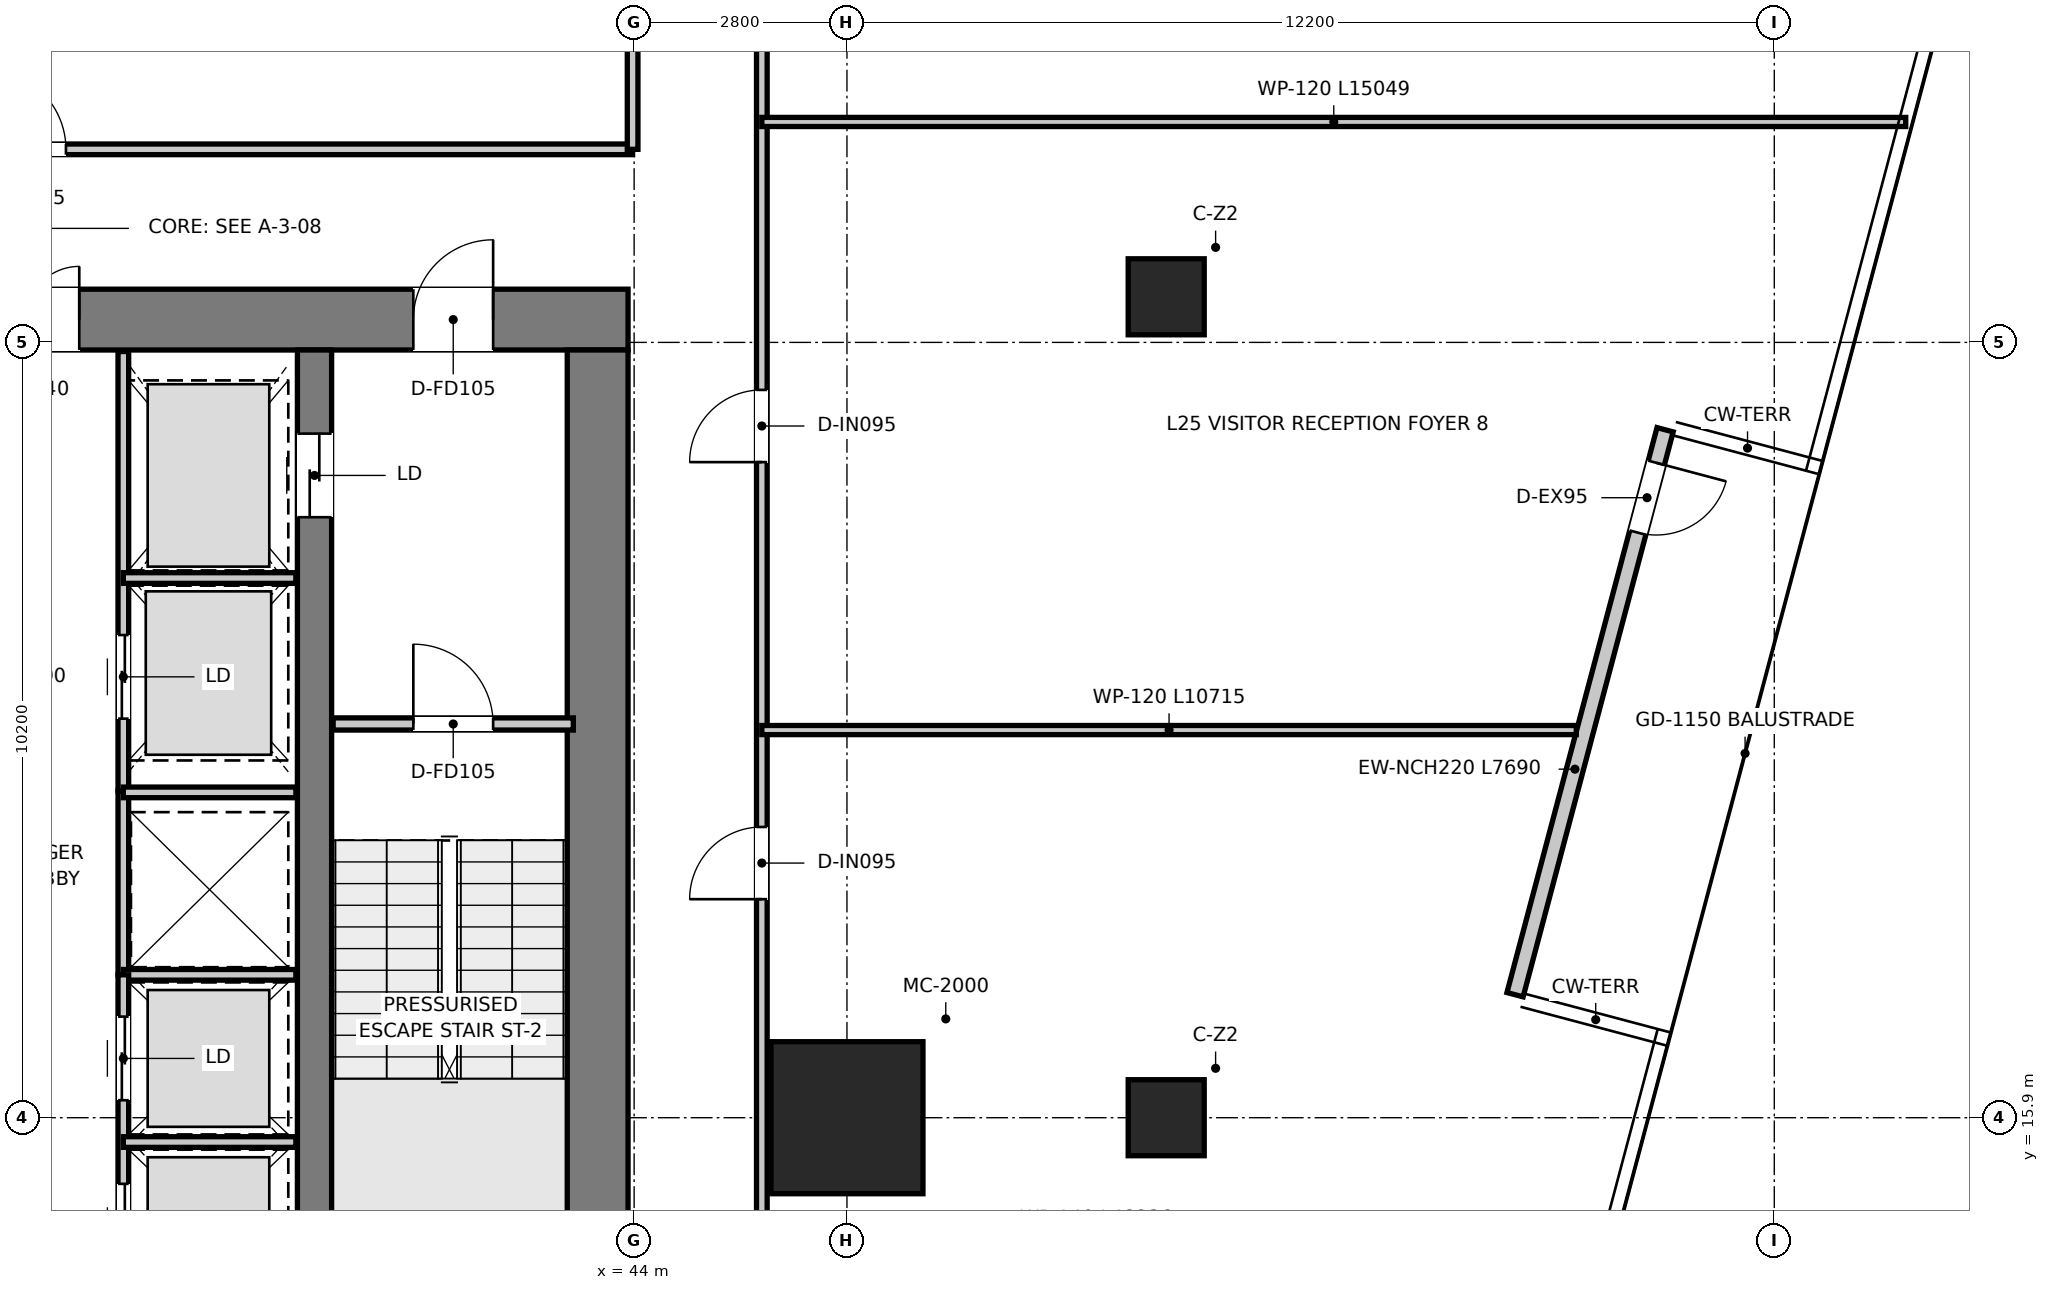
"""IFC4 building model, lengths in metres.
Left out: names, types, materials, properties, quantities, classifications, styles, units other than length and angle.
Written with IfcOpenShell. Run it as: python <this file> out.ifc"""

import sys

from ifc_helpers import new_model, si_unit, direction, frame, frame_2d, origin, origin_2d, place, context, subcontext, project, spatial, rectangle, extrude, source, transform, mapped, element, fill, save


model = new_model("IFC4")
c1 = context("Model", 3, precision=1e-05, world=origin(), true_north=direction((0.0, 1.0)))
c2 = subcontext(c1, "Body", "Model", "MODEL_VIEW")
j1 = project(units=[si_unit("LENGTHUNIT", "METRE"), si_unit("PLANEANGLEUNIT", "RADIAN")], contexts=[c1])
p1 = place(None, origin())
s1 = spatial("IfcSite", under=j1, at=p1, CompositionType="ELEMENT")
p2 = place(p1, origin())
s2 = spatial("IfcBuilding", under=s1, at=p2, CompositionType="ELEMENT")
p3 = place(p2, frame((0.0, 0.0, 105.85)))
s3 = spatial("IfcBuildingStorey", under=s2, at=p3, CompositionType="ELEMENT", Elevation=105.85)
p4 = place(p3, frame((28.08, 26.4, 0.0), z_axis=(0.0, 0.0, 1.0), x_axis=(1.0, 0.0, 0.0)))
e1 = element("IfcWall", 1, at=p4, inside=s3, PredefinedType="SHEAR", context=c2, shape_type="SweptSolid", body=[
    extrude(rectangle(XDim=15.84, YDim=0.8, at=frame_2d((7.92, 0.0))), origin(), (0.0, 0.0, 1.0), 3.95),
])
p5 = place(p4, frame((7.22, 0.0, 0.0)))
e2 = element("IfcOpeningElement", 2, at=p5, cuts=e1, PredefinedType="OPENING", context=c2, shape_type="SweptSolid", body=[
    extrude(rectangle(XDim=1.4, YDim=2.2, at=frame_2d((0.7, 1.1))), frame((0.0, 0.41, 0.0), z_axis=(0.0, -1.0, 0.0), x_axis=(1.0, 0.0, 0.0)), (0.0, 0.0, 1.0), 0.82),
])
p6 = place(p4, frame((1.775, 0.0, 0.0)))
e3 = element("IfcOpeningElement", 3, at=p6, cuts=e1, PredefinedType="OPENING", context=c2, shape_type="SweptSolid", body=[
    extrude(rectangle(XDim=1.05, YDim=2.1, at=frame_2d((0.525, 1.05))), frame((0.0, 0.41, 0.0), z_axis=(0.0, -1.0, 0.0), x_axis=(1.0, 0.0, 0.0)), (0.0, 0.0, 1.0), 0.82),
])
p7 = place(p4, frame((13.015, 0.0, 0.0)))
e4 = element("IfcOpeningElement", 4, at=p7, cuts=e1, PredefinedType="OPENING", context=c2, shape_type="SweptSolid", body=[
    extrude(rectangle(XDim=1.05, YDim=2.1, at=frame_2d((0.525, 1.05))), frame((0.0, 0.41, 0.0), z_axis=(0.0, -1.0, 0.0), x_axis=(1.0, 0.0, 0.0)), (0.0, 0.0, 1.0), 0.82),
])
p8 = place(p3, frame((43.52, 11.3, 0.0), z_axis=(0.0, 0.0, 1.0), x_axis=(0.0, 1.0, 0.0)))
e5 = element("IfcWall", 5, at=p8, inside=s3, PredefinedType="SHEAR", context=c2, shape_type="SweptSolid", body=[
    extrude(rectangle(XDim=14.7, YDim=0.8, at=frame_2d((7.35, 0.0))), origin(), (0.0, 0.0, 1.0), 3.95),
])
p9 = place(p3, frame((39.795, 13.22, 0.0), z_axis=(0.0, 0.0, 1.0), x_axis=(0.0, 1.0, 0.0)))
e6 = element("IfcWall", 6, at=p9, inside=s3, PredefinedType="SHEAR", context=c2, shape_type="SweptSolid", body=[
    extrude(rectangle(XDim=12.78, YDim=0.45, at=frame_2d((6.39, 0.0))), origin(), (0.0, 0.0, 1.0), 3.95),
])
p10 = place(p9, frame((10.58, 0.0, 0.0)))
e7 = element("IfcOpeningElement", 7, at=p10, cuts=e6, PredefinedType="OPENING", context=c2, shape_type="SweptSolid", body=[
    extrude(rectangle(XDim=1.1, YDim=2.15, at=frame_2d((0.55, 1.075))), frame((0.0, 0.235, 0.0), z_axis=(0.0, -1.0, 0.0), x_axis=(1.0, 0.0, 0.0)), (0.0, 0.0, 1.0), 0.47),
])
m1 = source(origin(), c2, "Body", "SweptSolid", [
    extrude(rectangle(XDim=2.0, YDim=2.0, at=origin_2d()), origin(), (0.0, 0.0, 1.0), 3.95),
])
p11 = place(p3, frame((46.8, 15.9, 0.0), z_axis=(0.0, 0.0, 1.0), x_axis=(1.0, 0.0, 0.0)))
e8 = element("IfcColumn", 8, at=p11, inside=s3, PredefinedType="USERDEFINED", context=c2, shape_type="MappedRepresentation", body=[
    mapped(m1, transform((0.0, 0.0, 0.0), x_axis=(1.0, 0.0, 0.0), y_axis=(0.0, 1.0, 0.0), z_axis=(0.0, 0.0, 1.0), scale=1.0)),
])
m2 = source(origin(), c2, "Body", "SweptSolid", [
    extrude(rectangle(XDim=1.0, YDim=1.0, at=origin_2d()), origin(), (0.0, 0.0, 1.0), 3.95),
])
for number, where, z_axis, x_axis in (
    (9, (51.0, 26.7, 0.0), (0.0, 0.0, 1.0), (1.0, 0.0, 0.0)),
    (10, (51.0, 15.9, 0.0), (0.0, 0.0, 1.0), (1.0, 0.0, 0.0)),
):
    element("IfcColumn", number, at=place(p3, frame(where, z_axis=z_axis, x_axis=x_axis)), inside=s3, PredefinedType="COLUMN", context=c2, shape_type="MappedRepresentation", body=[
        mapped(m2, transform((0.0, 0.0, 0.0), x_axis=(1.0, 0.0, 0.0), y_axis=(0.0, 1.0, 0.0), z_axis=(0.0, 0.0, 1.0), scale=1.0)),
    ])
p12 = place(p3, frame((57.563, 24.951, 0.0), z_axis=(0.0, 0.0, 1.0), x_axis=(-0.256717978083, -0.966486357756, 0.0)))
e11 = element("IfcWall", 11, at=p12, inside=s3, PredefinedType="ELEMENTEDWALL", context=c2, shape_type="SweptSolid", body=[
    extrude(rectangle(XDim=7.69, YDim=0.22, at=frame_2d((3.845, 0.0))), origin(), (0.0, 0.0, 1.0), 3.67),
])
p13 = place(p12, frame((0.45, 0.0, 0.0)))
e12 = element("IfcOpeningElement", 12, at=p13, cuts=e11, PredefinedType="OPENING", context=c2, shape_type="SweptSolid", body=[
    extrude(rectangle(XDim=0.95, YDim=2.1, at=frame_2d((0.475, 1.05))), frame((0.0, 0.12, 0.0), z_axis=(0.0, -1.0, 0.0), x_axis=(1.0, 0.0, 0.0)), (0.0, 0.0, 1.0), 0.24),
])
p14 = place(p3, frame((40.04, 21.08, 0.0), z_axis=(0.0, 0.0, 1.0), x_axis=(1.0, 0.0, 0.0)))
e13 = element("IfcWall", 13, at=p14, inside=s3, PredefinedType="PARTITIONING", context=c2, shape_type="SweptSolid", body=[
    extrude(rectangle(XDim=3.16, YDim=0.16, at=frame_2d((1.58, 0.0))), origin(), (0.0, 0.0, 1.0), 3.67),
])
p15 = place(p14, frame((1.055, 0.0, 0.0)))
e14 = element("IfcOpeningElement", 14, at=p15, cuts=e13, PredefinedType="OPENING", context=c2, shape_type="SweptSolid", body=[
    extrude(rectangle(XDim=1.05, YDim=2.1, at=frame_2d((0.525, 1.05))), frame((0.0, 0.09, 0.0), z_axis=(0.0, -1.0, 0.0), x_axis=(1.0, 0.0, 0.0)), (0.0, 0.0, 1.0), 0.18),
])
p16 = place(p3, frame((37.28, 20.2, 0.0), z_axis=(0.0, 0.0, 1.0), x_axis=(0.0, 1.0, 0.0)))
e15 = element("IfcWall", 15, at=p16, inside=s3, PredefinedType="PARTITIONING", context=c2, shape_type="SweptSolid", body=[
    extrude(rectangle(XDim=5.78, YDim=0.14, at=frame_2d((2.89, 0.0))), origin(), (0.0, 0.0, 1.0), 2.67),
])
p17 = place(p16, frame((0.95, 0.0, 0.0)))
e16 = element("IfcOpeningElement", 16, at=p17, cuts=e15, PredefinedType="OPENING", context=c2, shape_type="SweptSolid", body=[
    extrude(rectangle(XDim=1.1, YDim=2.15, at=frame_2d((0.55, 1.075))), frame((0.0, 0.08, 0.0), z_axis=(0.0, -1.0, 0.0), x_axis=(1.0, 0.0, 0.0)), (0.0, 0.0, 1.0), 0.16),
])
p18 = place(p3, frame((37.28, 23.0, 0.0), z_axis=(0.0, 0.0, 1.0), x_axis=(1.0, 0.0, 0.0)))
e17 = element("IfcWall", 17, at=p18, inside=s3, PredefinedType="PARTITIONING", context=c2, shape_type="SweptSolid", body=[
    extrude(rectangle(XDim=2.27, YDim=0.14, at=frame_2d((1.135, 0.0))), origin(), (0.0, 0.0, 1.0), 2.67),
])
p19 = place(p3, frame((37.28, 17.78, 0.0), z_axis=(0.0, 0.0, 1.0), x_axis=(0.0, 1.0, 0.0)))
e18 = element("IfcWall", 18, at=p19, inside=s3, PredefinedType="PARTITIONING", context=c2, shape_type="SweptSolid", body=[
    extrude(rectangle(XDim=2.42, YDim=0.14, at=frame_2d((1.21, 0.0))), origin(), (0.0, 0.0, 1.0), 3.67),
])
for number, where, z_axis, x_axis in (
    (19, (37.28, 17.78, 0.0), (0.0, 0.0, 1.0), (1.0, 0.0, 0.0)),
    (20, (37.28, 20.18, 0.0), (0.0, 0.0, 1.0), (1.0, 0.0, 0.0)),
):
    element("IfcWall", number, at=place(p3, frame(where, z_axis=z_axis, x_axis=x_axis)), inside=s3, PredefinedType="PARTITIONING", context=c2, shape_type="SweptSolid", body=[
        extrude(rectangle(XDim=2.27, YDim=0.14, at=frame_2d((1.135, 0.0))), origin(), (0.0, 0.0, 1.0), 3.67),
    ])
p20 = place(p3, frame((37.28, 13.22, 0.0), z_axis=(0.0, 0.0, 1.0), x_axis=(0.0, 1.0, 0.0)))
e21 = element("IfcWall", 21, at=p20, inside=s3, PredefinedType="PARTITIONING", context=c2, shape_type="SweptSolid", body=[
    extrude(rectangle(XDim=4.56, YDim=0.14, at=frame_2d((2.28, 0.0))), origin(), (0.0, 0.0, 1.0), 3.67),
])
p21 = place(p20, frame((0.71, 0.0, 0.0)))
e22 = element("IfcOpeningElement", 22, at=p21, cuts=e21, PredefinedType="OPENING", context=c2, shape_type="SweptSolid", body=[
    extrude(rectangle(XDim=1.1, YDim=2.15, at=frame_2d((0.55, 1.075))), frame((0.0, 0.08, 0.0), z_axis=(0.0, -1.0, 0.0), x_axis=(1.0, 0.0, 0.0)), (0.0, 0.0, 1.0), 0.16),
])
p22 = place(p20, frame((2.91, 0.0, 0.0)))
e23 = element("IfcOpeningElement", 23, at=p22, cuts=e21, PredefinedType="OPENING", context=c2, shape_type="SweptSolid", body=[
    extrude(rectangle(XDim=1.1, YDim=2.15, at=frame_2d((0.55, 1.075))), frame((0.0, 0.08, 0.0), z_axis=(0.0, -1.0, 0.0), x_axis=(1.0, 0.0, 0.0)), (0.0, 0.0, 1.0), 0.16),
])
p23 = place(p3, frame((37.28, 15.58, 0.0), z_axis=(0.0, 0.0, 1.0), x_axis=(1.0, 0.0, 0.0)))
e24 = element("IfcWall", 24, at=p23, inside=s3, PredefinedType="PARTITIONING", context=c2, shape_type="SweptSolid", body=[
    extrude(rectangle(XDim=2.27, YDim=0.14, at=frame_2d((1.135, 0.0))), origin(), (0.0, 0.0, 1.0), 3.67),
])
p24 = place(p3, frame((28.02, 28.64, 0.0), z_axis=(0.0, 0.0, 1.0), x_axis=(1.0, 0.0, 0.0)))
e25 = element("IfcWall", 25, at=p24, inside=s3, PredefinedType="PARTITIONING", context=c2, shape_type="SweptSolid", body=[
    extrude(rectangle(XDim=15.96, YDim=0.14, at=frame_2d((7.98, 0.0))), origin(), (0.0, 0.0, 1.0), 3.08),
])
p25 = place(p24, frame((7.455, 0.0, 0.0)))
e26 = element("IfcOpeningElement", 26, at=p25, cuts=e25, PredefinedType="OPENING", context=c2, shape_type="SweptSolid", body=[
    extrude(rectangle(XDim=1.05, YDim=2.15, at=frame_2d((0.525, 1.075))), frame((0.0, 0.08, 0.0), z_axis=(0.0, -1.0, 0.0), x_axis=(1.0, 0.0, 0.0)), (0.0, 0.0, 1.0), 0.16),
])
p26 = place(p3, frame((43.98, 28.64, 0.0), z_axis=(0.0, 0.0, 1.0), x_axis=(0.0, 1.0, 0.0)))
e27 = element("IfcWall", 27, at=p26, inside=s3, PredefinedType="PARTITIONING", context=c2, shape_type="SweptSolid", body=[
    extrude(rectangle(XDim=5.74, YDim=0.14, at=frame_2d((2.87, 0.0))), origin(), (0.0, 0.0, 1.0), 3.27),
])
p27 = place(p3, frame((45.68, 10.5, 0.0), z_axis=(0.0, 0.0, 1.0), x_axis=(0.0, 1.0, 0.0)))
e28 = element("IfcWall", 28, at=p27, inside=s3, PredefinedType="PARTITIONING", context=c2, shape_type="SweptSolid", body=[
    extrude(rectangle(XDim=25.62, YDim=0.14, at=frame_2d((12.81, 0.0))), origin(), (0.0, 0.0, 1.0), 2.97),
])
p28 = place(p27, frame((8.275, 0.0, 0.0)))
e29 = element("IfcOpeningElement", 29, at=p28, cuts=e28, PredefinedType="OPENING", context=c2, shape_type="SweptSolid", body=[
    extrude(rectangle(XDim=0.95, YDim=2.1, at=frame_2d((0.475, 1.05))), frame((0.0, 0.08, 0.0), z_axis=(0.0, -1.0, 0.0), x_axis=(1.0, 0.0, 0.0)), (0.0, 0.0, 1.0), 0.16),
])
p29 = place(p27, frame((14.025, 0.0, 0.0)))
e30 = element("IfcOpeningElement", 30, at=p29, cuts=e28, PredefinedType="OPENING", context=c2, shape_type="SweptSolid", body=[
    extrude(rectangle(XDim=0.95, YDim=2.1, at=frame_2d((0.475, 1.05))), frame((0.0, 0.08, 0.0), z_axis=(0.0, -1.0, 0.0), x_axis=(1.0, 0.0, 0.0)), (0.0, 0.0, 1.0), 0.16),
])
p30 = place(p27, frame((20.875, 0.0, 0.0)))
e31 = element("IfcOpeningElement", 31, at=p30, cuts=e28, PredefinedType="OPENING", context=c2, shape_type="SweptSolid", body=[
    extrude(rectangle(XDim=0.95, YDim=2.1, at=frame_2d((0.475, 1.05))), frame((0.0, 0.08, 0.0), z_axis=(0.0, -1.0, 0.0), x_axis=(1.0, 0.0, 0.0)), (0.0, 0.0, 1.0), 0.16),
])
p31 = place(p3, frame((45.68, 21.0, 0.0), z_axis=(0.0, 0.0, 1.0), x_axis=(1.0, 0.0, 0.0)))
e32 = element("IfcWall", 32, at=p31, inside=s3, PredefinedType="PARTITIONING", context=c2, shape_type="SweptSolid", body=[
    extrude(rectangle(XDim=10.715, YDim=0.12, at=frame_2d((5.358, 0.0))), origin(), (0.0, 0.0, 1.0), 2.97),
])
p32 = place(p3, frame((45.68, 29.0, 0.0), z_axis=(0.0, 0.0, 1.0), x_axis=(1.0, 0.0, 0.0)))
e33 = element("IfcWall", 33, at=p32, inside=s3, PredefinedType="PARTITIONING", context=c2, shape_type="SweptSolid", body=[
    extrude(rectangle(XDim=15.049, YDim=0.12, at=frame_2d((7.525, 0.0))), origin(), (0.0, 0.0, 1.0), 2.97),
])
p33 = place(p15, origin())
e34 = element("IfcDoor", 34, at=p33, inside=s3, OperationType="SINGLE_SWING_LEFT", PredefinedType="DOOR", context=c2, shape_type="SweptSolid", body=[
    extrude(rectangle(XDim=1.05, YDim=2.1, at=frame_2d((0.525, 1.05))), frame((0.0, 0.025, 0.0), z_axis=(0.0, -1.0, 0.0), x_axis=(1.0, 0.0, 0.0)), (0.0, 0.0, 1.0), 0.05),
])
fill(e14, e34)
p34 = place(p5, origin())
e35 = element("IfcDoor", 35, at=p34, inside=s3, OperationType="DOUBLE_DOOR_SINGLE_SWING", PredefinedType="DOOR", context=c2, shape_type="SweptSolid", body=[
    extrude(rectangle(XDim=1.4, YDim=2.2, at=frame_2d((0.7, 1.1))), frame((0.0, 0.025, 0.0), z_axis=(0.0, -1.0, 0.0), x_axis=(1.0, 0.0, 0.0)), (0.0, 0.0, 1.0), 0.05),
])
fill(e2, e35)
p35 = place(p7, origin())
e36 = element("IfcDoor", 36, at=p35, inside=s3, OperationType="SINGLE_SWING_RIGHT", PredefinedType="DOOR", context=c2, shape_type="SweptSolid", body=[
    extrude(rectangle(XDim=1.05, YDim=2.1, at=frame_2d((0.525, 1.05))), frame((0.0, 0.025, 0.0), z_axis=(0.0, -1.0, 0.0), x_axis=(1.0, 0.0, 0.0)), (0.0, 0.0, 1.0), 0.05),
])
fill(e4, e36)
p36 = place(p10, origin())
e37 = element("IfcDoor", 37, at=p36, inside=s3, OperationType="DOUBLE_DOOR_SLIDING", PredefinedType="DOOR", context=c2, shape_type="SweptSolid", body=[
    extrude(rectangle(XDim=1.1, YDim=2.15, at=frame_2d((0.55, 1.075))), frame((0.0, 0.025, 0.0), z_axis=(0.0, -1.0, 0.0), x_axis=(1.0, 0.0, 0.0)), (0.0, 0.0, 1.0), 0.05),
])
fill(e7, e37)
p37 = place(p17, origin())
e38 = element("IfcDoor", 38, at=p37, inside=s3, OperationType="DOUBLE_DOOR_SLIDING", PredefinedType="DOOR", context=c2, shape_type="SweptSolid", body=[
    extrude(rectangle(XDim=1.1, YDim=2.15, at=frame_2d((0.55, 1.075))), frame((0.0, 0.025, 0.0), z_axis=(0.0, -1.0, 0.0), x_axis=(1.0, 0.0, 0.0)), (0.0, 0.0, 1.0), 0.05),
])
fill(e16, e38)
p38 = place(p21, origin())
e39 = element("IfcDoor", 39, at=p38, inside=s3, OperationType="DOUBLE_DOOR_SLIDING", PredefinedType="DOOR", context=c2, shape_type="SweptSolid", body=[
    extrude(rectangle(XDim=1.1, YDim=2.15, at=frame_2d((0.55, 1.075))), frame((0.0, 0.025, 0.0), z_axis=(0.0, -1.0, 0.0), x_axis=(1.0, 0.0, 0.0)), (0.0, 0.0, 1.0), 0.05),
])
fill(e22, e39)
p39 = place(p22, origin())
e40 = element("IfcDoor", 40, at=p39, inside=s3, OperationType="DOUBLE_DOOR_SLIDING", PredefinedType="DOOR", context=c2, shape_type="SweptSolid", body=[
    extrude(rectangle(XDim=1.1, YDim=2.15, at=frame_2d((0.55, 1.075))), frame((0.0, 0.025, 0.0), z_axis=(0.0, -1.0, 0.0), x_axis=(1.0, 0.0, 0.0)), (0.0, 0.0, 1.0), 0.05),
])
fill(e23, e40)
p40 = place(p25, origin())
e41 = element("IfcDoor", 41, at=p40, inside=s3, OperationType="SINGLE_SWING_LEFT", PredefinedType="DOOR", context=c2, shape_type="SweptSolid", body=[
    extrude(rectangle(XDim=1.05, YDim=2.15, at=frame_2d((0.525, 1.075))), frame((0.0, 0.025, 0.0), z_axis=(0.0, -1.0, 0.0), x_axis=(1.0, 0.0, 0.0)), (0.0, 0.0, 1.0), 0.05),
])
fill(e26, e41)
p41 = place(p28, origin())
e42 = element("IfcDoor", 42, at=p41, inside=s3, OperationType="SINGLE_SWING_LEFT", PredefinedType="DOOR", context=c2, shape_type="SweptSolid", body=[
    extrude(rectangle(XDim=0.95, YDim=2.1, at=frame_2d((0.475, 1.05))), frame((0.0, 0.025, 0.0), z_axis=(0.0, -1.0, 0.0), x_axis=(1.0, 0.0, 0.0)), (0.0, 0.0, 1.0), 0.05),
])
fill(e29, e42)
p42 = place(p29, origin())
e43 = element("IfcDoor", 43, at=p42, inside=s3, OperationType="SINGLE_SWING_LEFT", PredefinedType="DOOR", context=c2, shape_type="SweptSolid", body=[
    extrude(rectangle(XDim=0.95, YDim=2.1, at=frame_2d((0.475, 1.05))), frame((0.0, 0.025, 0.0), z_axis=(0.0, -1.0, 0.0), x_axis=(1.0, 0.0, 0.0)), (0.0, 0.0, 1.0), 0.05),
])
fill(e30, e43)
p43 = place(p13, origin())
e44 = element("IfcDoor", 44, at=p43, inside=s3, OperationType="SINGLE_SWING_LEFT", PredefinedType="DOOR", context=c2, shape_type="SweptSolid", body=[
    extrude(rectangle(XDim=0.95, YDim=2.1, at=frame_2d((0.475, 1.05))), frame((0.0, 0.025, 0.0), z_axis=(0.0, -1.0, 0.0), x_axis=(1.0, 0.0, 0.0)), (0.0, 0.0, 1.0), 0.05),
])
fill(e12, e44)
save(model, sys.argv[1])
